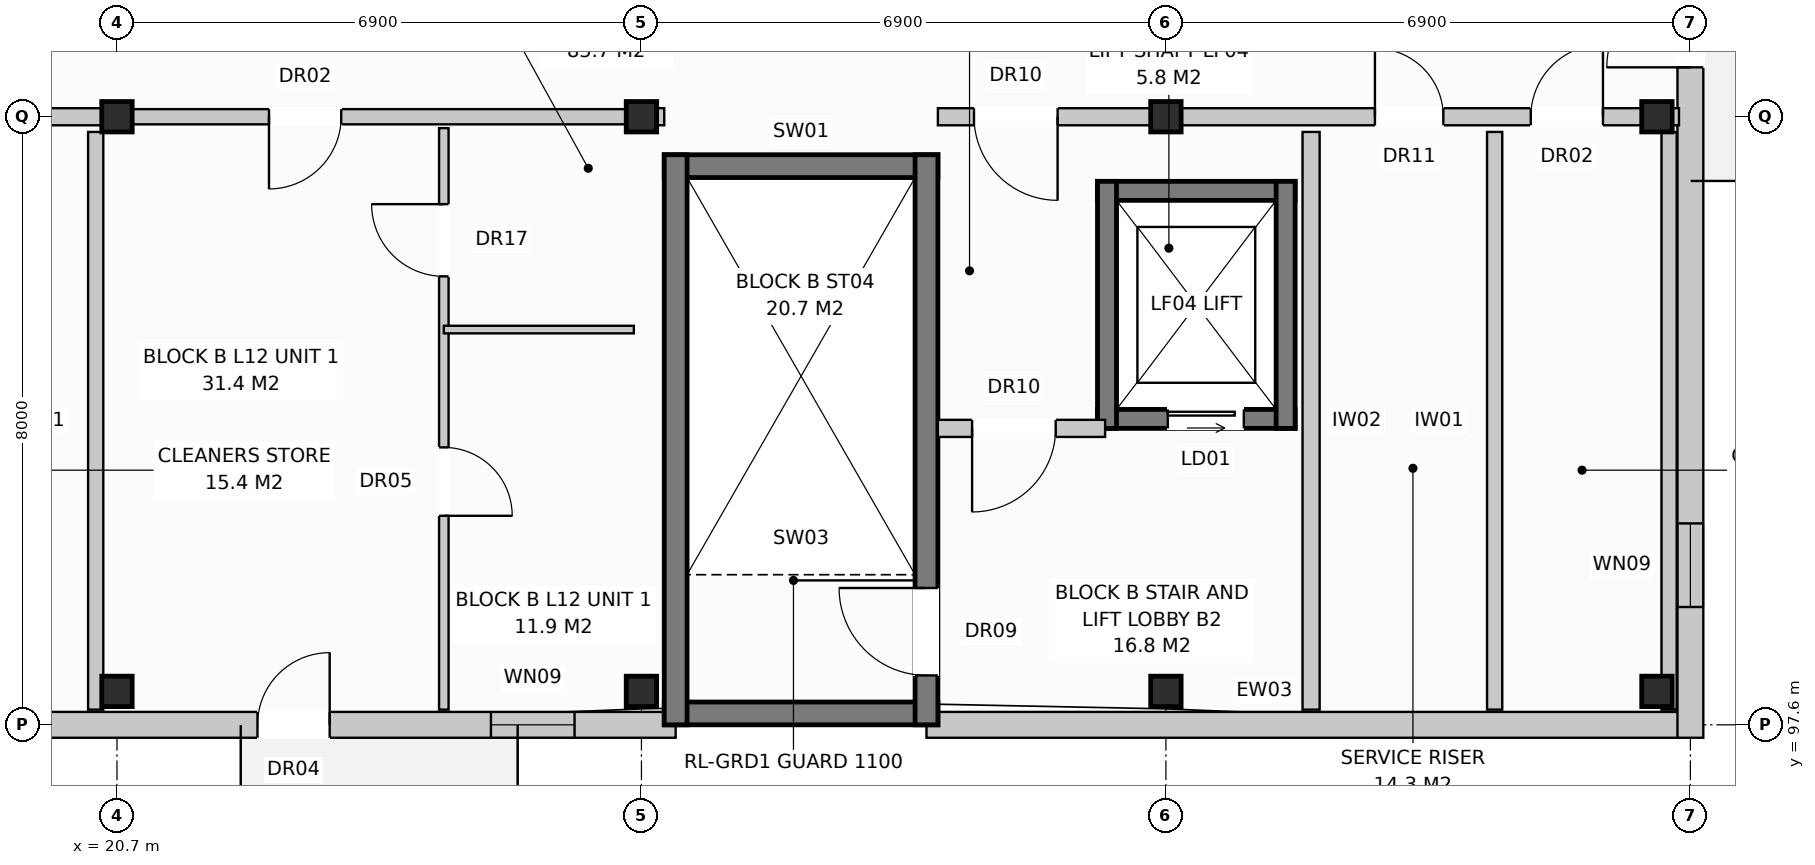
"""IFC4 building model, lengths in metres.
Left out: names, types, materials, properties, quantities, classifications, styles, units other than length and angle.
Written with IfcOpenShell. Run it as: python <this file> out.ifc"""

import sys

from ifc_helpers import new_model, si_unit, direction, frame, frame_2d, origin, origin_with_axes, origin_2d, place, context, subcontext, project, spatial, rectangle, extrude, element, fill, save


model = new_model("IFC4")
c1 = context("Model", 3, precision=1e-05, world=origin(), true_north=direction((0.0, 1.0)))
c2 = subcontext(c1, "Body", "Model", "MODEL_VIEW")
j1 = project(units=[si_unit("LENGTHUNIT", "METRE"), si_unit("PLANEANGLEUNIT", "RADIAN")], contexts=[c1])
p1 = place(None, origin())
s1 = spatial("IfcSite", under=j1, at=p1, CompositionType="ELEMENT")
p2 = place(p1, origin())
s2 = spatial("IfcBuilding", under=s1, at=p2, CompositionType="ELEMENT")
p3 = place(p2, frame((0.0, 0.0, 40.0)))
s3 = spatial("IfcBuildingStorey", under=s2, at=p3, CompositionType="ELEMENT", Elevation=40.0)
for number, where, z_axis, x_axis in (
    (1, (20.7, 98.04, 0.0), (0.0, 0.0, 1.0), (1.0, 0.0, 0.0)),
    (2, (20.7, 105.6, 0.0), (0.0, 0.0, 1.0), (1.0, 0.0, 0.0)),
    (3, (27.6, 98.04, 0.0), (0.0, 0.0, 1.0), (1.0, 0.0, 0.0)),
    (4, (27.6, 105.6, 0.0), (0.0, 0.0, 1.0), (1.0, 0.0, 0.0)),
    (5, (34.5, 98.04, 0.0), (0.0, 0.0, 1.0), (1.0, 0.0, 0.0)),
    (6, (34.5, 105.6, 0.0), (0.0, 0.0, 1.0), (1.0, 0.0, 0.0)),
    (7, (40.96, 98.04, 0.0), (0.0, 0.0, 1.0), (1.0, 0.0, 0.0)),
    (8, (40.96, 105.6, 0.0), (0.0, 0.0, 1.0), (1.0, 0.0, 0.0)),
):
    element("IfcColumn", number, at=place(p3, frame(where, z_axis=z_axis, x_axis=x_axis)), inside=s3, PredefinedType="COLUMN", context=c2, shape_type="SweptSolid", body=[
        extrude(rectangle(XDim=0.4, YDim=0.4, at=origin_2d()), origin(), (0.0, 0.0, 1.0), 3.2),
    ])
p4 = place(p3, frame((10.65, 97.6, 0.0), z_axis=(0.0, 0.0, 1.0), x_axis=(1.0, 0.0, 0.0)))
e9 = element("IfcWall", 9, at=p4, inside=s3, PredefinedType="STANDARD", context=c2, shape_type="SweptSolid", body=[
    extrude(rectangle(XDim=17.4, YDim=0.34, at=frame_2d((8.7, 0.0))), origin(), (0.0, 0.0, 1.0), 2.91),
])
p5 = place(p4, frame((11.898, 0.0, 0.0)))
e10 = element("IfcOpeningElement", 10, at=p5, cuts=e9, PredefinedType="OPENING", context=c2, shape_type="SweptSolid", body=[
    extrude(rectangle(XDim=0.95, YDim=2.1, at=frame_2d((0.475, 1.05))), frame((0.0, 0.182, 0.0), z_axis=(0.0, -1.0, 0.0), x_axis=(1.0, 0.0, 0.0)), (0.0, 0.0, 1.0), 0.364),
])
p6 = place(p4, frame((14.97, 0.0, 0.72)))
e11 = element("IfcOpeningElement", 11, at=p6, cuts=e9, PredefinedType="OPENING", context=c2, shape_type="SweptSolid", body=[
    extrude(rectangle(XDim=1.1, YDim=1.5, at=frame_2d((0.55, 0.75))), frame((0.0, 0.182, 0.0), z_axis=(0.0, -1.0, 0.0), x_axis=(1.0, 0.0, 0.0)), (0.0, 0.0, 1.0), 0.364),
])
p7 = place(p3, frame((31.35, 97.6, 0.0), z_axis=(0.0, 0.0, 1.0), x_axis=(1.0, 0.0, 0.0)))
e12 = element("IfcWall", 12, at=p7, inside=s3, PredefinedType="STANDARD", context=c2, shape_type="SweptSolid", body=[
    extrude(rectangle(XDim=9.89, YDim=0.34, at=frame_2d((4.945, 0.0))), origin(), (0.0, 0.0, 1.0), 2.91),
])
p8 = place(p3, frame((41.4, 97.43, 0.0), z_axis=(0.0, 0.0, 1.0), x_axis=(0.0, 1.0, 0.0)))
e13 = element("IfcWall", 13, at=p8, inside=s3, PredefinedType="STANDARD", context=c2, shape_type="SweptSolid", body=[
    extrude(rectangle(XDim=18.74, YDim=0.34, at=frame_2d((9.37, 0.0))), origin(), (0.0, 0.0, 1.0), 2.91),
])
p9 = place(p8, frame((8.82, 0.0, 0.0)))
e14 = element("IfcOpeningElement", 14, at=p9, cuts=e13, PredefinedType="OPENING", context=c2, shape_type="SweptSolid", body=[
    extrude(rectangle(XDim=1.1, YDim=2.1, at=frame_2d((0.55, 1.05))), frame((0.0, 0.182, 0.0), z_axis=(0.0, -1.0, 0.0), x_axis=(1.0, 0.0, 0.0)), (0.0, 0.0, 1.0), 0.364),
])
p10 = place(p8, frame((1.72, 0.0, 0.72)))
e15 = element("IfcOpeningElement", 15, at=p10, cuts=e13, PredefinedType="OPENING", context=c2, shape_type="SweptSolid", body=[
    extrude(rectangle(XDim=1.1, YDim=1.5, at=frame_2d((0.55, 0.75))), frame((0.0, 0.182, 0.0), z_axis=(0.0, -1.0, 0.0), x_axis=(1.0, 0.0, 0.0)), (0.0, 0.0, 1.0), 0.364),
])
p11 = place(p8, frame((15.92, 0.0, 0.72)))
e16 = element("IfcOpeningElement", 16, at=p11, cuts=e13, PredefinedType="OPENING", context=c2, shape_type="SweptSolid", body=[
    extrude(rectangle(XDim=1.1, YDim=1.5, at=frame_2d((0.55, 0.75))), frame((0.0, 0.182, 0.0), z_axis=(0.0, -1.0, 0.0), x_axis=(1.0, 0.0, 0.0)), (0.0, 0.0, 1.0), 0.364),
])
p12 = place(p3, frame((20.42, 97.8, 0.0), z_axis=(0.0, 0.0, 1.0), x_axis=(0.0, 1.0, 0.0)))
e17 = element("IfcWall", 17, at=p12, inside=s3, PredefinedType="PARTITIONING", context=c2, shape_type="SweptSolid", body=[
    extrude(rectangle(XDim=7.6, YDim=0.2, at=frame_2d((3.8, 0.0))), origin(), (0.0, 0.0, 1.0), 2.97),
])
p13 = place(p3, frame((10.8, 105.6, 0.0), z_axis=(0.0, 0.0, 1.0), x_axis=(1.0, 0.0, 0.0)))
e18 = element("IfcWall", 18, at=p13, inside=s3, PredefinedType="PARTITIONING", context=c2, shape_type="SweptSolid", body=[
    extrude(rectangle(XDim=9.9, YDim=0.225, at=frame_2d((4.95, 0.0))), origin(), (0.0, 0.0, 1.0), 2.35),
])
p14 = place(p13, frame((0.475, 0.0, 0.0)))
e19 = element("IfcOpeningElement", 19, at=p14, cuts=e18, PredefinedType="OPENING", context=c2, shape_type="SweptSolid", body=[
    extrude(rectangle(XDim=1.1, YDim=2.15, at=frame_2d((0.55, 1.075))), frame((0.0, 0.125, 0.0), z_axis=(0.0, -1.0, 0.0), x_axis=(1.0, 0.0, 0.0)), (0.0, 0.0, 1.0), 0.249),
])
p15 = place(p13, frame((5.75, 0.0, 0.0)))
e20 = element("IfcOpeningElement", 20, at=p15, cuts=e18, PredefinedType="OPENING", context=c2, shape_type="SweptSolid", body=[
    extrude(rectangle(XDim=0.9, YDim=2.1, at=frame_2d((0.45, 1.05))), frame((0.0, 0.125, 0.0), z_axis=(0.0, -1.0, 0.0), x_axis=(1.0, 0.0, 0.0)), (0.0, 0.0, 1.0), 0.249),
])
p16 = place(p13, frame((7.8, 0.0, 0.0)))
e21 = element("IfcOpeningElement", 21, at=p16, cuts=e18, PredefinedType="OPENING", context=c2, shape_type="SweptSolid", body=[
    extrude(rectangle(XDim=0.95, YDim=2.15, at=frame_2d((0.475, 1.075))), frame((0.0, 0.125, 0.0), z_axis=(0.0, -1.0, 0.0), x_axis=(1.0, 0.0, 0.0)), (0.0, 0.0, 1.0), 0.249),
])
for number, where, z_axis, x_axis in (
    (22, (27.9, 97.75, 0.0), (0.0, 0.0, 1.0), (1.0, 0.0, 0.0)),
    (23, (27.9, 104.95, 0.0), (0.0, 0.0, 1.0), (1.0, 0.0, 0.0)),
):
    element("IfcWall", number, at=place(p3, frame(where, z_axis=z_axis, x_axis=x_axis)), inside=s3, PredefinedType="SHEAR", context=c2, shape_type="SweptSolid", body=[
        extrude(rectangle(XDim=3.6, YDim=0.3, at=frame_2d((1.8, 0.0))), origin(), (0.0, 0.0, 1.0), 2.97),
    ])
p17 = place(p3, frame((28.05, 97.6, 0.0), z_axis=(0.0, 0.0, 1.0), x_axis=(0.0, 1.0, 0.0)))
e24 = element("IfcWall", 24, at=p17, inside=s3, PredefinedType="SHEAR", context=c2, shape_type="SweptSolid", body=[
    extrude(rectangle(XDim=7.5, YDim=0.3, at=frame_2d((3.75, 0.0))), origin(), (0.0, 0.0, 1.0), 2.97),
])
p18 = place(p3, frame((31.35, 97.6, 0.0), z_axis=(0.0, 0.0, 1.0), x_axis=(0.0, 1.0, 0.0)))
e25 = element("IfcWall", 25, at=p18, inside=s3, PredefinedType="SHEAR", context=c2, shape_type="SweptSolid", body=[
    extrude(rectangle(XDim=7.5, YDim=0.3, at=frame_2d((3.75, 0.0))), origin(), (0.0, 0.0, 1.0), 2.97),
])
p19 = place(p18, frame((0.65, 0.0, 0.0)))
e26 = element("IfcOpeningElement", 26, at=p19, cuts=e25, PredefinedType="OPENING", context=c2, shape_type="SweptSolid", body=[
    extrude(rectangle(XDim=1.15, YDim=2.15, at=frame_2d((0.575, 1.075))), frame((0.0, 0.162, 0.0), z_axis=(0.0, -1.0, 0.0), x_axis=(1.0, 0.0, 0.0)), (0.0, 0.0, 1.0), 0.324),
])
p20 = place(p3, frame((33.6, 101.625, 0.0), z_axis=(0.0, 0.0, 1.0), x_axis=(1.0, 0.0, 0.0)))
e27 = element("IfcWall", 27, at=p20, inside=s3, PredefinedType="SHEAR", context=c2, shape_type="SweptSolid", body=[
    extrude(rectangle(XDim=2.6, YDim=0.25, at=frame_2d((1.3, 0.0))), origin(), (0.0, 0.0, 1.0), 2.97),
])
p21 = place(p20, frame((0.925, 0.0, 0.0)))
e28 = element("IfcOpeningElement", 28, at=p21, cuts=e27, PredefinedType="OPENING", context=c2, shape_type="SweptSolid", body=[
    extrude(rectangle(XDim=1.0, YDim=2.1, at=frame_2d((0.5, 1.05))), frame((0.0, 0.137, 0.0), z_axis=(0.0, -1.0, 0.0), x_axis=(1.0, 0.0, 0.0)), (0.0, 0.0, 1.0), 0.274),
])
p22 = place(p3, frame((33.6, 104.625, 0.0), z_axis=(0.0, 0.0, 1.0), x_axis=(1.0, 0.0, 0.0)))
e29 = element("IfcWall", 29, at=p22, inside=s3, PredefinedType="SHEAR", context=c2, shape_type="SweptSolid", body=[
    extrude(rectangle(XDim=2.6, YDim=0.25, at=frame_2d((1.3, 0.0))), origin(), (0.0, 0.0, 1.0), 2.97),
])
for number, where, z_axis, x_axis in (
    (30, (33.725, 101.5, 0.0), (0.0, 0.0, 1.0), (0.0, 1.0, 0.0)),
    (31, (36.075, 101.5, 0.0), (0.0, 0.0, 1.0), (0.0, 1.0, 0.0)),
):
    element("IfcWall", number, at=place(p3, frame(where, z_axis=z_axis, x_axis=x_axis)), inside=s3, PredefinedType="SHEAR", context=c2, shape_type="SweptSolid", body=[
        extrude(rectangle(XDim=3.25, YDim=0.25, at=frame_2d((1.625, 0.0))), origin(), (0.0, 0.0, 1.0), 2.97),
    ])
p23 = place(p3, frame((36.41, 97.8, 0.0), z_axis=(0.0, 0.0, 1.0), x_axis=(0.0, 1.0, 0.0)))
e32 = element("IfcWall", 32, at=p23, inside=s3, PredefinedType="PARTITIONING", context=c2, shape_type="SweptSolid", body=[
    extrude(rectangle(XDim=7.6, YDim=0.225, at=frame_2d((3.8, 0.0))), origin(), (0.0, 0.0, 1.0), 2.59),
])
p24 = place(p3, frame((31.5, 101.5, 0.0), z_axis=(0.0, 0.0, 1.0), x_axis=(1.0, 0.0, 0.0)))
e33 = element("IfcWall", 33, at=p24, inside=s3, PredefinedType="PARTITIONING", context=c2, shape_type="SweptSolid", body=[
    extrude(rectangle(XDim=2.2, YDim=0.225, at=frame_2d((1.1, 0.0))), origin(), (0.0, 0.0, 1.0), 2.97),
])
p25 = place(p24, frame((0.45, 0.0, 0.0)))
e34 = element("IfcOpeningElement", 34, at=p25, cuts=e33, PredefinedType="OPENING", context=c2, shape_type="SweptSolid", body=[
    extrude(rectangle(XDim=1.1, YDim=2.15, at=frame_2d((0.55, 1.075))), frame((0.0, 0.125, 0.0), z_axis=(0.0, -1.0, 0.0), x_axis=(1.0, 0.0, 0.0)), (0.0, 0.0, 1.0), 0.249),
])
p26 = place(p3, frame((27.6, 105.6, 0.0), z_axis=(0.0, 0.0, 1.0), x_axis=(1.0, 0.0, 0.0)))
e35 = element("IfcWall", 35, at=p26, inside=s3, PredefinedType="PARTITIONING", context=c2, shape_type="SweptSolid", body=[
    extrude(rectangle(XDim=0.3, YDim=0.225, at=frame_2d((0.15, 0.0))), origin(), (0.0, 0.0, 1.0), 2.97),
])
p27 = place(p3, frame((38.825, 97.8, 0.0), z_axis=(0.0, 0.0, 1.0), x_axis=(0.0, 1.0, 0.0)))
e36 = element("IfcWall", 36, at=p27, inside=s3, PredefinedType="PARTITIONING", context=c2, shape_type="SweptSolid", body=[
    extrude(rectangle(XDim=7.6, YDim=0.2, at=frame_2d((3.8, 0.0))), origin(), (0.0, 0.0, 1.0), 2.97),
])
p28 = place(p3, frame((41.12, 97.8, 0.0), z_axis=(0.0, 0.0, 1.0), x_axis=(0.0, 1.0, 0.0)))
e37 = element("IfcWall", 37, at=p28, inside=s3, PredefinedType="PARTITIONING", context=c2, shape_type="SweptSolid", body=[
    extrude(rectangle(XDim=7.6, YDim=0.2, at=frame_2d((3.8, 0.0))), origin(), (0.0, 0.0, 1.0), 2.35),
])
p29 = place(p3, frame((31.5, 105.6, 0.0), z_axis=(0.0, 0.0, 1.0), x_axis=(1.0, 0.0, 0.0)))
e38 = element("IfcWall", 38, at=p29, inside=s3, PredefinedType="PARTITIONING", context=c2, shape_type="SweptSolid", body=[
    extrude(rectangle(XDim=9.75, YDim=0.225, at=frame_2d((4.875, 0.0))), origin(), (0.0, 0.0, 1.0), 2.35),
])
p30 = place(p29, frame((0.475, 0.0, 0.0)))
e39 = element("IfcOpeningElement", 39, at=p30, cuts=e38, PredefinedType="OPENING", context=c2, shape_type="SweptSolid", body=[
    extrude(rectangle(XDim=1.1, YDim=2.15, at=frame_2d((0.55, 1.075))), frame((0.0, 0.125, 0.0), z_axis=(0.0, -1.0, 0.0), x_axis=(1.0, 0.0, 0.0)), (0.0, 0.0, 1.0), 0.249),
])
p31 = place(p29, frame((5.75, 0.0, 0.0)))
e40 = element("IfcOpeningElement", 40, at=p31, cuts=e38, PredefinedType="OPENING", context=c2, shape_type="SweptSolid", body=[
    extrude(rectangle(XDim=0.9, YDim=2.1, at=frame_2d((0.45, 1.05))), frame((0.0, 0.125, 0.0), z_axis=(0.0, -1.0, 0.0), x_axis=(1.0, 0.0, 0.0)), (0.0, 0.0, 1.0), 0.249),
])
p32 = place(p29, frame((7.8, 0.0, 0.0)))
e41 = element("IfcOpeningElement", 41, at=p32, cuts=e38, PredefinedType="OPENING", context=c2, shape_type="SweptSolid", body=[
    extrude(rectangle(XDim=0.95, YDim=2.15, at=frame_2d((0.475, 1.075))), frame((0.0, 0.125, 0.0), z_axis=(0.0, -1.0, 0.0), x_axis=(1.0, 0.0, 0.0)), (0.0, 0.0, 1.0), 0.249),
])
p33 = place(p3, frame((20.7, 105.6, 0.0), z_axis=(0.0, 0.0, 1.0), x_axis=(1.0, 0.0, 0.0)))
e42 = element("IfcWall", 42, at=p33, inside=s3, PredefinedType="PARTITIONING", context=c2, shape_type="SweptSolid", body=[
    extrude(rectangle(XDim=6.9, YDim=0.2, at=frame_2d((3.45, 0.0))), origin(), (0.0, 0.0, 1.0), 2.35),
])
p34 = place(p33, frame((2.0, 0.0, 0.0)))
e43 = element("IfcOpeningElement", 43, at=p34, cuts=e42, PredefinedType="OPENING", context=c2, shape_type="SweptSolid", body=[
    extrude(rectangle(XDim=0.95, YDim=2.15, at=frame_2d((0.475, 1.075))), frame((0.0, 0.112, 0.0), z_axis=(0.0, -1.0, 0.0), x_axis=(1.0, 0.0, 0.0)), (0.0, 0.0, 1.0), 0.224),
])
p35 = place(p3, frame((25.0, 105.45, 0.0), z_axis=(0.0, 0.0, 1.0), x_axis=(0.0, -1.0, 0.0)))
e44 = element("IfcWall", 44, at=p35, inside=s3, PredefinedType="PARTITIONING", context=c2, shape_type="SweptSolid", body=[
    extrude(rectangle(XDim=7.65, YDim=0.125, at=frame_2d((3.825, 0.0))), origin(), (0.0, 0.0, 1.0), 2.59),
])
p36 = place(p35, frame((1.0, 0.0, 0.0)))
e45 = element("IfcOpeningElement", 45, at=p36, cuts=e44, PredefinedType="OPENING", context=c2, shape_type="SweptSolid", body=[
    extrude(rectangle(XDim=0.95, YDim=2.1, at=frame_2d((0.475, 1.05))), frame((0.0, 0.074, 0.0), z_axis=(0.0, -1.0, 0.0), x_axis=(1.0, 0.0, 0.0)), (0.0, 0.0, 1.0), 0.149),
])
p37 = place(p35, frame((4.2, 0.0, 0.0)))
e46 = element("IfcOpeningElement", 46, at=p37, cuts=e44, PredefinedType="OPENING", context=c2, shape_type="SweptSolid", body=[
    extrude(rectangle(XDim=0.9, YDim=2.1, at=frame_2d((0.45, 1.05))), frame((0.0, 0.074, 0.0), z_axis=(0.0, -1.0, 0.0), x_axis=(1.0, 0.0, 0.0)), (0.0, 0.0, 1.0), 0.149),
])
p38 = place(p3, frame((25.0, 102.8, 0.0), z_axis=(0.0, 0.0, 1.0), x_axis=(1.0, 0.0, 0.0)))
e47 = element("IfcWall", 47, at=p38, inside=s3, PredefinedType="PARTITIONING", context=c2, shape_type="SweptSolid", body=[
    extrude(rectangle(XDim=2.5, YDim=0.1, at=frame_2d((1.25, 0.0))), origin(), (0.0, 0.0, 1.0), 2.97),
])
p39 = place(p5, origin_with_axes())
e48 = element("IfcDoor", 48, at=p39, inside=s3, OperationType="SINGLE_SWING_RIGHT", PredefinedType="DOOR", context=c2, shape_type="SweptSolid", body=[
    extrude(rectangle(XDim=0.95, YDim=2.1, at=frame_2d((0.475, 1.05))), frame((0.0, 0.025, 0.0), z_axis=(0.0, -1.0, 0.0), x_axis=(1.0, 0.0, 0.0)), (0.0, 0.0, 1.0), 0.05),
])
fill(e10, e48)
p40 = place(p6, origin_with_axes())
e49 = element("IfcWindow", 49, at=p40, inside=s3, PartitioningType="SINGLE_PANEL", PredefinedType="WINDOW", context=c2, shape_type="SweptSolid", body=[
    extrude(rectangle(XDim=1.1, YDim=1.5, at=frame_2d((0.55, 0.75))), frame((0.0, 0.03, 0.0), z_axis=(0.0, -1.0, 0.0), x_axis=(1.0, 0.0, 0.0)), (0.0, 0.0, 1.0), 0.06),
])
fill(e11, e49)
p41 = place(p9, origin_with_axes())
e50 = element("IfcDoor", 50, at=p41, inside=s3, OperationType="SINGLE_SWING_LEFT", PredefinedType="DOOR", context=c2, shape_type="SweptSolid", body=[
    extrude(rectangle(XDim=1.1, YDim=2.1, at=frame_2d((0.55, 1.05))), frame((0.0, 0.025, 0.0), z_axis=(0.0, -1.0, 0.0), x_axis=(1.0, 0.0, 0.0)), (0.0, 0.0, 1.0), 0.05),
])
fill(e14, e50)
p42 = place(p10, origin_with_axes())
e51 = element("IfcWindow", 51, at=p42, inside=s3, PartitioningType="SINGLE_PANEL", PredefinedType="WINDOW", context=c2, shape_type="SweptSolid", body=[
    extrude(rectangle(XDim=1.1, YDim=1.5, at=frame_2d((0.55, 0.75))), frame((0.0, 0.03, 0.0), z_axis=(0.0, -1.0, 0.0), x_axis=(1.0, 0.0, 0.0)), (0.0, 0.0, 1.0), 0.06),
])
fill(e15, e51)
p43 = place(p19, origin_with_axes())
e52 = element("IfcDoor", 52, at=p43, inside=s3, OperationType="SINGLE_SWING_RIGHT", PredefinedType="DOOR", context=c2, shape_type="SweptSolid", body=[
    extrude(rectangle(XDim=1.15, YDim=2.15, at=frame_2d((0.575, 1.075))), frame((0.0, 0.025, 0.0), z_axis=(0.0, -1.0, 0.0), x_axis=(1.0, 0.0, 0.0)), (0.0, 0.0, 1.0), 0.05),
])
fill(e26, e52)
p44 = place(p21, origin_with_axes())
e53 = element("IfcDoor", 53, at=p44, inside=s3, OperationType="SLIDING_TO_LEFT", PredefinedType="DOOR", context=c2, shape_type="SweptSolid", body=[
    extrude(rectangle(XDim=1.0, YDim=2.1, at=frame_2d((0.5, 1.05))), frame((0.0, 0.025, 0.0), z_axis=(0.0, -1.0, 0.0), x_axis=(1.0, 0.0, 0.0)), (0.0, 0.0, 1.0), 0.05),
])
fill(e28, e53)
p45 = place(p25, frame((1.1, 0.0, 0.0), z_axis=(0.0, 0.0, 1.0), x_axis=(-1.0, 0.0, 0.0)))
e54 = element("IfcDoor", 54, at=p45, inside=s3, OperationType="SINGLE_SWING_LEFT", PredefinedType="DOOR", context=c2, shape_type="SweptSolid", body=[
    extrude(rectangle(XDim=1.1, YDim=2.15, at=frame_2d((0.55, 1.075))), frame((0.0, 0.025, 0.0), z_axis=(0.0, -1.0, 0.0), x_axis=(1.0, 0.0, 0.0)), (0.0, 0.0, 1.0), 0.05),
])
fill(e34, e54)
p46 = place(p30, frame((1.1, 0.0, 0.0), z_axis=(0.0, 0.0, 1.0), x_axis=(-1.0, 0.0, 0.0)))
e55 = element("IfcDoor", 55, at=p46, inside=s3, OperationType="SINGLE_SWING_RIGHT", PredefinedType="DOOR", context=c2, shape_type="SweptSolid", body=[
    extrude(rectangle(XDim=1.1, YDim=2.15, at=frame_2d((0.55, 1.075))), frame((0.0, 0.025, 0.0), z_axis=(0.0, -1.0, 0.0), x_axis=(1.0, 0.0, 0.0)), (0.0, 0.0, 1.0), 0.05),
])
fill(e39, e55)
p47 = place(p31, origin_with_axes())
e56 = element("IfcDoor", 56, at=p47, inside=s3, OperationType="SINGLE_SWING_LEFT", PredefinedType="DOOR", context=c2, shape_type="SweptSolid", body=[
    extrude(rectangle(XDim=0.9, YDim=2.1, at=frame_2d((0.45, 1.05))), frame((0.0, 0.025, 0.0), z_axis=(0.0, -1.0, 0.0), x_axis=(1.0, 0.0, 0.0)), (0.0, 0.0, 1.0), 0.05),
])
fill(e40, e56)
p48 = place(p32, origin_with_axes())
e57 = element("IfcDoor", 57, at=p48, inside=s3, OperationType="SINGLE_SWING_RIGHT", PredefinedType="DOOR", context=c2, shape_type="SweptSolid", body=[
    extrude(rectangle(XDim=0.95, YDim=2.15, at=frame_2d((0.475, 1.075))), frame((0.0, 0.025, 0.0), z_axis=(0.0, -1.0, 0.0), x_axis=(1.0, 0.0, 0.0)), (0.0, 0.0, 1.0), 0.05),
])
fill(e41, e57)
p49 = place(p34, frame((0.95, 0.0, 0.0), z_axis=(0.0, 0.0, 1.0), x_axis=(-1.0, 0.0, 0.0)))
e58 = element("IfcDoor", 58, at=p49, inside=s3, OperationType="SINGLE_SWING_LEFT", PredefinedType="DOOR", context=c2, shape_type="SweptSolid", body=[
    extrude(rectangle(XDim=0.95, YDim=2.15, at=frame_2d((0.475, 1.075))), frame((0.0, 0.025, 0.0), z_axis=(0.0, -1.0, 0.0), x_axis=(1.0, 0.0, 0.0)), (0.0, 0.0, 1.0), 0.05),
])
fill(e43, e58)
p50 = place(p36, frame((0.95, 0.0, 0.0), z_axis=(0.0, 0.0, 1.0), x_axis=(-1.0, 0.0, 0.0)))
e59 = element("IfcDoor", 59, at=p50, inside=s3, OperationType="SINGLE_SWING_LEFT", PredefinedType="DOOR", context=c2, shape_type="SweptSolid", body=[
    extrude(rectangle(XDim=0.95, YDim=2.1, at=frame_2d((0.475, 1.05))), frame((0.0, 0.025, 0.0), z_axis=(0.0, -1.0, 0.0), x_axis=(1.0, 0.0, 0.0)), (0.0, 0.0, 1.0), 0.05),
])
fill(e45, e59)
p51 = place(p37, origin_with_axes())
e60 = element("IfcDoor", 60, at=p51, inside=s3, OperationType="SINGLE_SWING_RIGHT", PredefinedType="DOOR", context=c2, shape_type="SweptSolid", body=[
    extrude(rectangle(XDim=0.9, YDim=2.1, at=frame_2d((0.45, 1.05))), frame((0.0, 0.025, 0.0), z_axis=(0.0, -1.0, 0.0), x_axis=(1.0, 0.0, 0.0)), (0.0, 0.0, 1.0), 0.05),
])
fill(e46, e60)
save(model, sys.argv[1])
